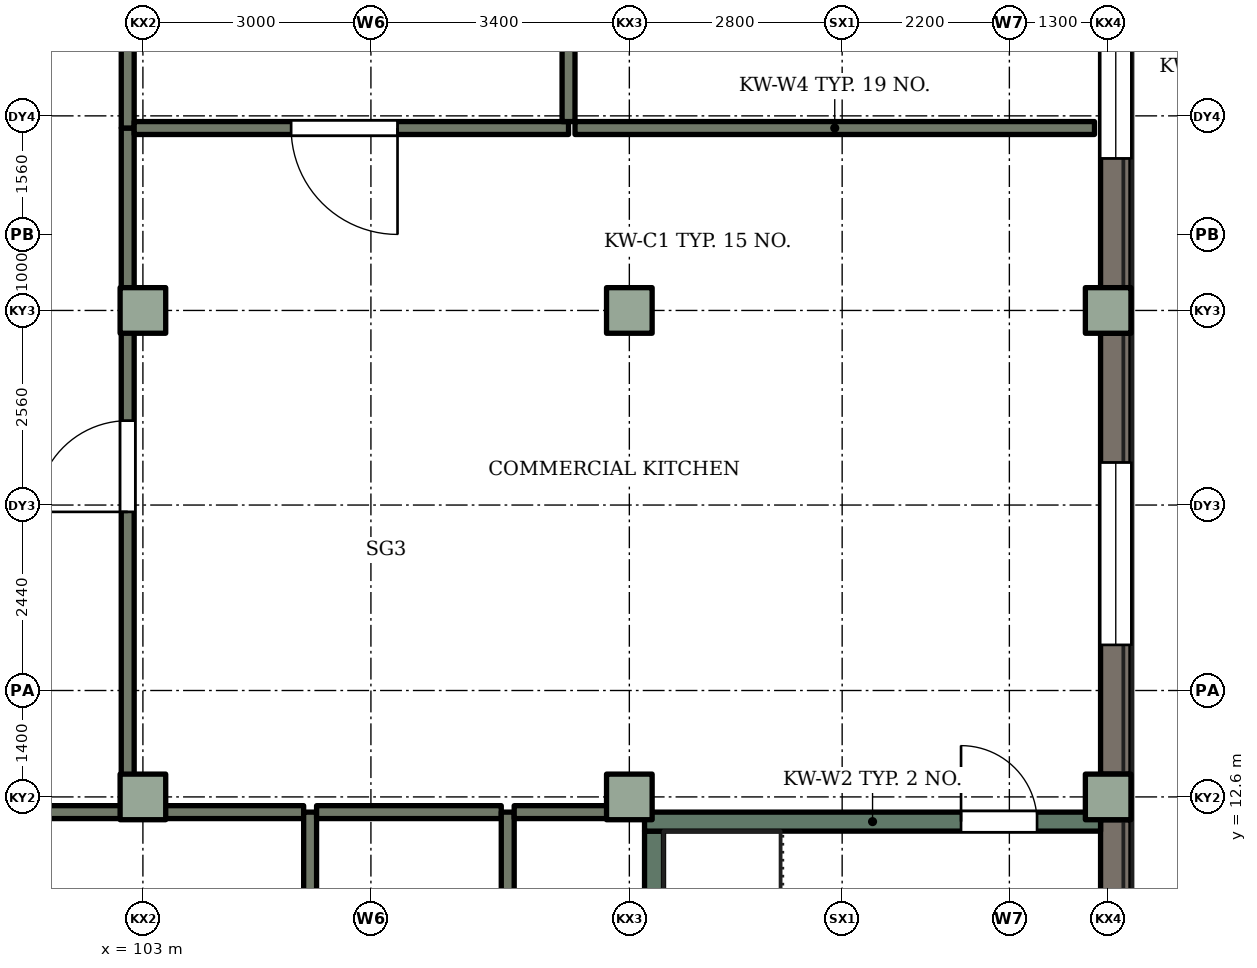
"""IFC4 building model, lengths in metres.
Left out: names, types, materials, properties, quantities, classifications, styles, units other than length and angle.
Written with IfcOpenShell. Run it as: python <this file> out.ifc"""

import sys

from ifc_helpers import new_model, si_unit, direction, frame, frame_2d, origin, origin_2d, place, context, subcontext, project, spatial, rectangle, extrude, element, fill, save


model = new_model("IFC4")
c1 = context("Model", 3, precision=1e-05, world=origin(), true_north=direction((0.0, 1.0)))
c2 = subcontext(c1, "Body", "Model", "MODEL_VIEW")
j1 = project(units=[si_unit("LENGTHUNIT", "METRE"), si_unit("PLANEANGLEUNIT", "RADIAN")], contexts=[c1])
p1 = place(None, origin())
s1 = spatial("IfcSite", under=j1, at=p1, CompositionType="ELEMENT")
p2 = place(p1, origin())
s2 = spatial("IfcBuilding", under=s1, at=p2, CompositionType="ELEMENT")
p3 = place(p2, origin())
s3 = spatial("IfcBuildingStorey", under=s2, at=p3, CompositionType="ELEMENT", Elevation=0.0)
for number, where, z_axis, x_axis in (
    (1, (103.0, 12.6, 0.0), (0.0, 0.0, 1.0), (1.0, 0.0, 0.0)),
    (2, (103.0, 19.0, 0.0), (0.0, 0.0, 1.0), (1.0, 0.0, 0.0)),
    (3, (109.4, 12.6, 0.0), (0.0, 0.0, 1.0), (1.0, 0.0, 0.0)),
    (4, (109.4, 19.0, 0.0), (0.0, 0.0, 1.0), (1.0, 0.0, 0.0)),
    (5, (115.7, 12.6, 0.0), (0.0, 0.0, 1.0), (1.0, 0.0, 0.0)),
    (6, (115.7, 19.0, 0.0), (0.0, 0.0, 1.0), (1.0, 0.0, 0.0)),
):
    element("IfcColumn", number, at=place(p3, frame(where, z_axis=z_axis, x_axis=x_axis)), inside=s3, PredefinedType="COLUMN", context=c2, shape_type="SweptSolid", body=[
        extrude(rectangle(XDim=0.6, YDim=0.6, at=origin_2d()), origin(), (0.0, 0.0, 1.0), 4.2),
    ])
p4 = place(p3, frame((115.8, 12.3, 0.0), z_axis=(0.0, 0.0, 1.0), x_axis=(0.0, -1.0, 0.0)))
e7 = element("IfcWall", 7, at=p4, inside=s3, PredefinedType="SOLIDWALL", context=c2, shape_type="SweptSolid", body=[
    extrude(rectangle(XDim=5.7, YDim=0.4, at=frame_2d((2.85, 0.0))), origin(), (0.0, 0.0, 1.0), 4.2),
])
p5 = place(p4, frame((1.6, 0.0, 0.0)))
e8 = element("IfcOpeningElement", 8, at=p5, cuts=e7, PredefinedType="OPENING", context=c2, shape_type="SweptSolid", body=[
    extrude(rectangle(XDim=1.0, YDim=2.4, at=frame_2d((0.5, 1.2))), frame((0.0, 0.21, 0.0), z_axis=(0.0, -1.0, 0.0), x_axis=(1.0, 0.0, 0.0)), (0.0, 0.0, 1.0), 0.42),
])
p6 = place(p3, frame((115.8, 18.7, 0.0), z_axis=(0.0, 0.0, 1.0), x_axis=(0.0, -1.0, 0.0)))
e9 = element("IfcWall", 9, at=p6, inside=s3, PredefinedType="SOLIDWALL", context=c2, shape_type="SweptSolid", body=[
    extrude(rectangle(XDim=5.8, YDim=0.4, at=frame_2d((2.9, 0.0))), origin(), (0.0, 0.0, 1.0), 4.2),
])
p7 = place(p6, frame((1.7, 0.0, 1.5)))
e10 = element("IfcOpeningElement", 10, at=p7, cuts=e9, PredefinedType="OPENING", context=c2, shape_type="SweptSolid", body=[
    extrude(rectangle(XDim=2.4, YDim=1.2, at=frame_2d((1.2, 0.6))), frame((0.0, 0.21, 0.0), z_axis=(0.0, -1.0, 0.0), x_axis=(1.0, 0.0, 0.0)), (0.0, 0.0, 1.0), 0.42),
])
p8 = place(p3, frame((115.8, 25.1, 0.0), z_axis=(0.0, 0.0, 1.0), x_axis=(0.0, -1.0, 0.0)))
e11 = element("IfcWall", 11, at=p8, inside=s3, PredefinedType="SOLIDWALL", context=c2, shape_type="SweptSolid", body=[
    extrude(rectangle(XDim=5.8, YDim=0.4, at=frame_2d((2.9, 0.0))), origin(), (0.0, 0.0, 1.0), 4.2),
])
p9 = place(p8, frame((1.7, 0.0, 1.5)))
e12 = element("IfcOpeningElement", 12, at=p9, cuts=e11, PredefinedType="OPENING", context=c2, shape_type="SweptSolid", body=[
    extrude(rectangle(XDim=2.4, YDim=1.2, at=frame_2d((1.2, 0.6))), frame((0.0, 0.21, 0.0), z_axis=(0.0, -1.0, 0.0), x_axis=(1.0, 0.0, 0.0)), (0.0, 0.0, 1.0), 0.42),
])
p10 = place(p3, frame((109.725, 6.4, 0.0), z_axis=(0.0, 0.0, 1.0), x_axis=(0.0, 1.0, 0.0)))
e13 = element("IfcWall", 13, at=p10, inside=s3, PredefinedType="SHEAR", context=c2, shape_type="SweptSolid", body=[
    extrude(rectangle(XDim=5.75, YDim=0.25, at=frame_2d((2.875, 0.0))), origin(), (0.0, 0.0, 1.0), 4.2),
])
p11 = place(p3, frame((109.6, 12.275, 0.0), z_axis=(0.0, 0.0, 1.0), x_axis=(1.0, 0.0, 0.0)))
e14 = element("IfcWall", 14, at=p11, inside=s3, PredefinedType="SHEAR", context=c2, shape_type="SweptSolid", body=[
    extrude(rectangle(XDim=6.0, YDim=0.25, at=frame_2d((3.0, 0.0))), origin(), (0.0, 0.0, 1.0), 4.2),
])
p12 = place(p11, frame((4.164, 0.0, 0.0)))
e15 = element("IfcOpeningElement", 15, at=p12, cuts=e14, PredefinedType="OPENING", context=c2, shape_type="SweptSolid", body=[
    extrude(rectangle(XDim=1.0, YDim=2.1, at=frame_2d((0.5, 1.05))), frame((0.0, 0.135, 0.0), z_axis=(0.0, -1.0, 0.0), x_axis=(1.0, 0.0, 0.0)), (0.0, 0.0, 1.0), 0.27),
])
p13 = place(p3, frame((102.8, 12.4, 0.0), z_axis=(0.0, 0.0, 1.0), x_axis=(-1.0, 0.0, 0.0)))
e16 = element("IfcWall", 16, at=p13, inside=s3, PredefinedType="PARTITIONING", context=c2, shape_type="SweptSolid", body=[
    extrude(rectangle(XDim=1.115, YDim=0.17, at=frame_2d((0.558, 0.0))), origin(), (0.0, 0.0, 1.0), 3.92),
])
p14 = place(p3, frame((102.8, 12.485, 0.0), z_axis=(0.0, 0.0, 1.0), x_axis=(0.0, 1.0, 0.0)))
e17 = element("IfcWall", 17, at=p14, inside=s3, PredefinedType="PARTITIONING", context=c2, shape_type="SweptSolid", body=[
    extrude(rectangle(XDim=8.915, YDim=0.17, at=frame_2d((4.458, 0.0))), origin(), (0.0, 0.0, 1.0), 3.92),
])
p15 = place(p14, frame((3.865, 0.0, 0.0)))
e18 = element("IfcOpeningElement", 18, at=p15, cuts=e17, PredefinedType="OPENING", context=c2, shape_type="SweptSolid", body=[
    extrude(rectangle(XDim=1.2, YDim=2.1, at=frame_2d((0.6, 1.05))), frame((0.0, 0.095, 0.0), z_axis=(0.0, -1.0, 0.0), x_axis=(1.0, 0.0, 0.0)), (0.0, 0.0, 1.0), 0.19),
])
p16 = place(p3, frame((102.8, 21.4, 0.0), z_axis=(0.0, 0.0, 1.0), x_axis=(0.0, 1.0, 0.0)))
e19 = element("IfcWall", 19, at=p16, inside=s3, PredefinedType="PARTITIONING", context=c2, shape_type="SweptSolid", body=[
    extrude(rectangle(XDim=3.92, YDim=0.17, at=frame_2d((1.96, 0.0))), origin(), (0.0, 0.0, 1.0), 3.92),
])
p17 = place(p3, frame((105.115, 12.4, 0.0), z_axis=(0.0, 0.0, 1.0), x_axis=(-1.0, 0.0, 0.0)))
e20 = element("IfcWall", 20, at=p17, inside=s3, PredefinedType="PARTITIONING", context=c2, shape_type="SweptSolid", body=[
    extrude(rectangle(XDim=2.23, YDim=0.17, at=frame_2d((1.115, 0.0))), origin(), (0.0, 0.0, 1.0), 3.92),
])
p18 = place(p3, frame((105.2, 6.48, 0.0), z_axis=(0.0, 0.0, 1.0), x_axis=(0.0, 1.0, 0.0)))
e21 = element("IfcWall", 21, at=p18, inside=s3, PredefinedType="PARTITIONING", context=c2, shape_type="SweptSolid", body=[
    extrude(rectangle(XDim=5.92, YDim=0.17, at=frame_2d((2.96, 0.0))), origin(), (0.0, 0.0, 1.0), 3.92),
])
p19 = place(p18, frame((2.57, 0.0, 0.0)))
e22 = element("IfcOpeningElement", 22, at=p19, cuts=e21, PredefinedType="OPENING", context=c2, shape_type="SweptSolid", body=[
    extrude(rectangle(XDim=0.8, YDim=2.1, at=frame_2d((0.4, 1.05))), frame((0.0, 0.095, 0.0), z_axis=(0.0, -1.0, 0.0), x_axis=(1.0, 0.0, 0.0)), (0.0, 0.0, 1.0), 0.19),
])
p20 = place(p3, frame((107.715, 12.4, 0.0), z_axis=(0.0, 0.0, 1.0), x_axis=(-1.0, 0.0, 0.0)))
e23 = element("IfcWall", 23, at=p20, inside=s3, PredefinedType="PARTITIONING", context=c2, shape_type="SweptSolid", body=[
    extrude(rectangle(XDim=2.43, YDim=0.17, at=frame_2d((1.215, 0.0))), origin(), (0.0, 0.0, 1.0), 3.92),
])
p21 = place(p3, frame((107.8, 6.48, 0.0), z_axis=(0.0, 0.0, 1.0), x_axis=(0.0, 1.0, 0.0)))
e24 = element("IfcWall", 24, at=p21, inside=s3, PredefinedType="PARTITIONING", context=c2, shape_type="SweptSolid", body=[
    extrude(rectangle(XDim=5.92, YDim=0.17, at=frame_2d((2.96, 0.0))), origin(), (0.0, 0.0, 1.0), 3.92),
])
p22 = place(p3, frame((108.6, 21.4, 0.0), z_axis=(0.0, 0.0, 1.0), x_axis=(-1.0, 0.0, 0.0)))
e25 = element("IfcWall", 25, at=p22, inside=s3, PredefinedType="PARTITIONING", context=c2, shape_type="SweptSolid", body=[
    extrude(rectangle(XDim=5.715, YDim=0.17, at=frame_2d((2.857, 0.0))), origin(), (0.0, 0.0, 1.0), 3.92),
])
p23 = place(p22, frame((2.25, 0.0, 0.0)))
e26 = element("IfcOpeningElement", 26, at=p23, cuts=e25, PredefinedType="OPENING", context=c2, shape_type="SweptSolid", body=[
    extrude(rectangle(XDim=1.4, YDim=2.1, at=frame_2d((0.7, 1.05))), frame((0.0, 0.095, 0.0), z_axis=(0.0, -1.0, 0.0), x_axis=(1.0, 0.0, 0.0)), (0.0, 0.0, 1.0), 0.19),
])
p24 = place(p3, frame((108.6, 21.485, 0.0), z_axis=(0.0, 0.0, 1.0), x_axis=(0.0, 1.0, 0.0)))
e27 = element("IfcWall", 27, at=p24, inside=s3, PredefinedType="PARTITIONING", context=c2, shape_type="SweptSolid", body=[
    extrude(rectangle(XDim=3.915, YDim=0.17, at=frame_2d((1.958, 0.0))), origin(), (0.0, 0.0, 1.0), 3.92),
])
p25 = place(p3, frame((109.52, 12.4, 0.0), z_axis=(0.0, 0.0, 1.0), x_axis=(-1.0, 0.0, 0.0)))
e28 = element("IfcWall", 28, at=p25, inside=s3, PredefinedType="PARTITIONING", context=c2, shape_type="SweptSolid", body=[
    extrude(rectangle(XDim=1.635, YDim=0.17, at=frame_2d((0.817, 0.0))), origin(), (0.0, 0.0, 1.0), 3.92),
])
p26 = place(p3, frame((115.52, 21.4, 0.0), z_axis=(0.0, 0.0, 1.0), x_axis=(-1.0, 0.0, 0.0)))
e29 = element("IfcWall", 29, at=p26, inside=s3, PredefinedType="PARTITIONING", context=c2, shape_type="SweptSolid", body=[
    extrude(rectangle(XDim=6.835, YDim=0.17, at=frame_2d((3.417, 0.0))), origin(), (0.0, 0.0, 1.0), 3.92),
])
p27 = place(p3, frame((115.6, 12.48, 0.0), z_axis=(0.0, 0.0, 1.0), x_axis=(0.0, 1.0, 0.0)))
e30 = element("IfcWall", 30, at=p27, inside=s3, PredefinedType="PARTITIONING", context=c2, shape_type="SweptSolid", body=[
    extrude(rectangle(XDim=0.34, YDim=0.17, at=frame_2d((0.17, 0.0))), origin(), (0.0, 0.0, 1.0), 3.92),
])
p28 = place(p3, frame((115.6, 18.78, 0.0), z_axis=(0.0, 0.0, 1.0), x_axis=(0.0, 1.0, 0.0)))
e31 = element("IfcWall", 31, at=p28, inside=s3, PredefinedType="PARTITIONING", context=c2, shape_type="SweptSolid", body=[
    extrude(rectangle(XDim=0.44, YDim=0.17, at=frame_2d((0.22, 0.0))), origin(), (0.0, 0.0, 1.0), 3.92),
])
p29 = place(p7, origin())
e32 = element("IfcWindow", 32, at=p29, inside=s3, PartitioningType="SINGLE_PANEL", PredefinedType="WINDOW", context=c2, shape_type="SweptSolid", body=[
    extrude(rectangle(XDim=2.4, YDim=1.2, at=frame_2d((1.2, 0.6))), frame((0.0, 0.03, 0.0), z_axis=(0.0, -1.0, 0.0), x_axis=(1.0, 0.0, 0.0)), (0.0, 0.0, 1.0), 0.06),
])
fill(e10, e32)
p30 = place(p9, origin())
e33 = element("IfcWindow", 33, at=p30, inside=s3, PartitioningType="SINGLE_PANEL", PredefinedType="WINDOW", context=c2, shape_type="SweptSolid", body=[
    extrude(rectangle(XDim=2.4, YDim=1.2, at=frame_2d((1.2, 0.6))), frame((0.0, 0.03, 0.0), z_axis=(0.0, -1.0, 0.0), x_axis=(1.0, 0.0, 0.0)), (0.0, 0.0, 1.0), 0.06),
])
fill(e12, e33)
p31 = place(p12, origin())
e34 = element("IfcDoor", 34, at=p31, inside=s3, OperationType="SINGLE_SWING_LEFT", PredefinedType="DOOR", context=c2, shape_type="SweptSolid", body=[
    extrude(rectangle(XDim=1.0, YDim=2.1, at=frame_2d((0.5, 1.05))), frame((0.0, 0.025, 0.0), z_axis=(0.0, -1.0, 0.0), x_axis=(1.0, 0.0, 0.0)), (0.0, 0.0, 1.0), 0.05),
])
fill(e15, e34)
p32 = place(p15, origin())
e35 = element("IfcDoor", 35, at=p32, inside=s3, OperationType="SINGLE_SWING_LEFT", PredefinedType="DOOR", context=c2, shape_type="SweptSolid", body=[
    extrude(rectangle(XDim=1.2, YDim=2.1, at=frame_2d((0.6, 1.05))), frame((0.0, 0.025, 0.0), z_axis=(0.0, -1.0, 0.0), x_axis=(1.0, 0.0, 0.0)), (0.0, 0.0, 1.0), 0.05),
])
fill(e18, e35)
p33 = place(p23, origin())
e36 = element("IfcDoor", 36, at=p33, inside=s3, OperationType="DOUBLE_DOOR_SINGLE_SWING", PredefinedType="DOOR", context=c2, shape_type="SweptSolid", body=[
    extrude(rectangle(XDim=1.4, YDim=2.1, at=frame_2d((0.7, 1.05))), frame((0.0, 0.025, 0.0), z_axis=(0.0, -1.0, 0.0), x_axis=(1.0, 0.0, 0.0)), (0.0, 0.0, 1.0), 0.05),
])
fill(e26, e36)
save(model, sys.argv[1])
